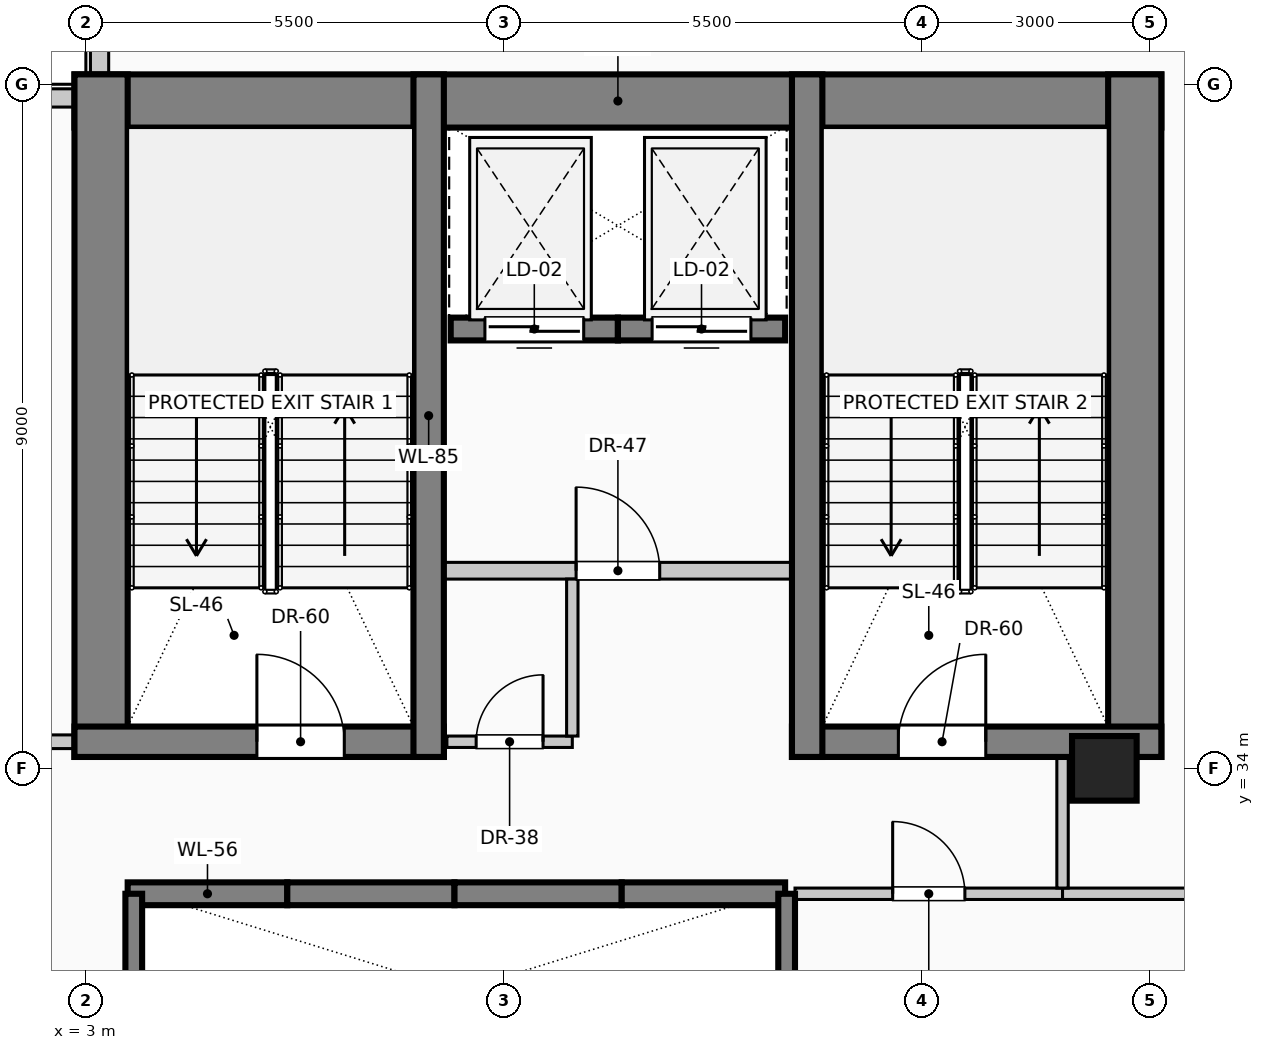
"""IFC4 building model, lengths in metres.
Left out: names, types, materials, properties, quantities, classifications, styles, units other than length and angle.
Written with IfcOpenShell. Run it as: python <this file> out.ifc"""

import sys

from ifc_helpers import new_model, si_unit, direction, frame, frame_2d, origin, origin_2d, place, context, subcontext, project, spatial, rectangle, circle, extrude, element, fill, save


model = new_model("IFC4")
c1 = context("Model", 3, precision=1e-05, world=origin(), true_north=direction((0.0, 1.0)))
c2 = subcontext(c1, "Body", "Model", "MODEL_VIEW")
j1 = project(units=[si_unit("LENGTHUNIT", "METRE"), si_unit("PLANEANGLEUNIT", "RADIAN")], contexts=[c1])
p1 = place(None, origin())
s1 = spatial("IfcSite", under=j1, at=p1, CompositionType="ELEMENT")
p2 = place(p1, origin())
s2 = spatial("IfcBuilding", under=s1, at=p2, CompositionType="ELEMENT")
p3 = place(p2, frame((0.0, 0.0, 182.6)))
s3 = spatial("IfcBuildingStorey", under=s2, at=p3, CompositionType="ELEMENT", Elevation=182.6)
p4 = place(p3, frame((2.85, 42.78, 0.0), z_axis=(0.0, 0.0, 1.0), x_axis=(1.0, 0.0, 0.0)))
e1 = element("IfcWall", 1, at=p4, inside=s3, PredefinedType="SHEAR", context=c2, shape_type="SweptSolid", body=[
    extrude(rectangle(XDim=14.3, YDim=0.7, at=frame_2d((7.15, 0.0))), origin(), (0.0, 0.0, 1.0), 4.0),
])
for number, where, z_axis, x_axis in (
    (2, (3.2, 34.15, 0.0), (0.0, 0.0, 1.0), (0.0, 1.0, 0.0)),
    (3, (16.8, 34.15, 0.0), (0.0, 0.0, 1.0), (0.0, 1.0, 0.0)),
):
    element("IfcWall", number, at=place(p3, frame(where, z_axis=z_axis, x_axis=x_axis)), inside=s3, PredefinedType="SHEAR", context=c2, shape_type="SweptSolid", body=[
        extrude(rectangle(XDim=8.98, YDim=0.7, at=frame_2d((4.49, 0.0))), origin(), (0.0, 0.0, 1.0), 4.0),
    ])
p5 = place(p3, frame((2.85, 34.35, 0.0), z_axis=(0.0, 0.0, 1.0), x_axis=(1.0, 0.0, 0.0)))
e4 = element("IfcWall", 4, at=p5, inside=s3, PredefinedType="SHEAR", context=c2, shape_type="SweptSolid", body=[
    extrude(rectangle(XDim=4.86, YDim=0.4, at=frame_2d((2.43, 0.0))), origin(), (0.0, 0.0, 1.0), 4.0),
])
p6 = place(p5, frame((2.4, 0.0, 0.0)))
e5 = element("IfcOpeningElement", 5, at=p6, cuts=e4, PredefinedType="OPENING", context=c2, shape_type="SweptSolid", body=[
    extrude(rectangle(XDim=1.15, YDim=2.2, at=frame_2d((0.575, 1.1))), frame((0.0, 0.21, 0.0), z_axis=(0.0, -1.0, 0.0), x_axis=(1.0, 0.0, 0.0)), (0.0, 0.0, 1.0), 0.42),
])
p7 = place(p3, frame((12.29, 34.35, 0.0), z_axis=(0.0, 0.0, 1.0), x_axis=(1.0, 0.0, 0.0)))
e6 = element("IfcWall", 6, at=p7, inside=s3, PredefinedType="SHEAR", context=c2, shape_type="SweptSolid", body=[
    extrude(rectangle(XDim=4.86, YDim=0.4, at=frame_2d((2.43, 0.0))), origin(), (0.0, 0.0, 1.0), 4.0),
])
p8 = place(p7, frame((1.4, 0.0, 0.0)))
e7 = element("IfcOpeningElement", 7, at=p8, cuts=e6, PredefinedType="OPENING", context=c2, shape_type="SweptSolid", body=[
    extrude(rectangle(XDim=1.15, YDim=2.2, at=frame_2d((0.575, 1.1))), frame((0.0, 0.21, 0.0), z_axis=(0.0, -1.0, 0.0), x_axis=(1.0, 0.0, 0.0)), (0.0, 0.0, 1.0), 0.42),
])
for number, where, z_axis, x_axis in (
    (8, (7.51, 34.15, 0.0), (0.0, 0.0, 1.0), (0.0, 1.0, 0.0)),
    (9, (12.49, 34.15, 0.0), (0.0, 0.0, 1.0), (0.0, 1.0, 0.0)),
):
    element("IfcWall", number, at=place(p3, frame(where, z_axis=z_axis, x_axis=x_axis)), inside=s3, PredefinedType="SHEAR", context=c2, shape_type="SweptSolid", body=[
        extrude(rectangle(XDim=8.98, YDim=0.4, at=frame_2d((4.49, 0.0))), origin(), (0.0, 0.0, 1.0), 4.0),
    ])
p9 = place(p3, frame((16.4, 34.0, 0.0), z_axis=(0.0, 0.0, 1.0), x_axis=(1.0, 0.0, 0.0)))
e10 = element("IfcColumn", 10, at=p9, inside=s3, PredefinedType="COLUMN", context=c2, shape_type="SweptSolid", body=[
    extrude(circle(Radius=0.425, at=origin_2d()), origin(), (0.0, 0.0, 1.0), 4.0),
])
p10 = place(p3, frame((0.6, 42.82, 0.0), z_axis=(0.0, 0.0, 1.0), x_axis=(1.0, 0.0, 0.0)))
e11 = element("IfcWall", 11, at=p10, inside=s3, PredefinedType="SOLIDWALL", context=c2, shape_type="SweptSolid", body=[
    extrude(rectangle(XDim=2.245, YDim=0.24, at=frame_2d((1.123, 0.0))), origin(), (0.0, 0.0, 1.0), 3.75),
])
p11 = place(p3, frame((3.18, 43.135, 0.0), z_axis=(0.0, 0.0, 1.0), x_axis=(0.0, 1.0, 0.0)))
e12 = element("IfcWall", 12, at=p11, inside=s3, PredefinedType="SOLIDWALL", context=c2, shape_type="SweptSolid", body=[
    extrude(rectangle(XDim=2.265, YDim=0.24, at=frame_2d((1.132, 0.0))), origin(), (0.0, 0.0, 1.0), 3.75),
])
p12 = place(p3, frame((3.55, 32.35, 0.0), z_axis=(0.0, 0.0, 1.0), x_axis=(1.0, 0.0, 0.0)))
e13 = element("IfcWall", 13, at=p12, inside=s3, PredefinedType="SOLIDWALL", context=c2, shape_type="SweptSolid", body=[
    extrude(rectangle(XDim=2.1, YDim=0.3, at=frame_2d((1.05, 0.0))), origin(), (0.0, 0.0, 1.0), 4.0),
])
p13 = place(p3, frame((5.65, 32.35, 0.0), z_axis=(0.0, 0.0, 1.0), x_axis=(1.0, 0.0, 0.0)))
e14 = element("IfcWall", 14, at=p13, inside=s3, PredefinedType="SOLIDWALL", context=c2, shape_type="SweptSolid", body=[
    extrude(rectangle(XDim=2.2, YDim=0.3, at=frame_2d((1.1, 0.0))), origin(), (0.0, 0.0, 1.0), 4.0),
])
p14 = place(p3, frame((7.85, 32.35, 0.0), z_axis=(0.0, 0.0, 1.0), x_axis=(1.0, 0.0, 0.0)))
e15 = element("IfcWall", 15, at=p14, inside=s3, PredefinedType="SOLIDWALL", context=c2, shape_type="SweptSolid", body=[
    extrude(rectangle(XDim=2.2, YDim=0.3, at=frame_2d((1.1, 0.0))), origin(), (0.0, 0.0, 1.0), 4.0),
])
p15 = place(p3, frame((10.05, 32.35, 0.0), z_axis=(0.0, 0.0, 1.0), x_axis=(1.0, 0.0, 0.0)))
e16 = element("IfcWall", 16, at=p15, inside=s3, PredefinedType="SOLIDWALL", context=c2, shape_type="SweptSolid", body=[
    extrude(rectangle(XDim=2.15, YDim=0.3, at=frame_2d((1.075, 0.0))), origin(), (0.0, 0.0, 1.0), 4.0),
])
p16 = place(p3, frame((10.0, 39.78, 0.0), z_axis=(0.0, 0.0, 1.0), x_axis=(-1.0, 0.0, 0.0)))
e17 = element("IfcWall", 17, at=p16, inside=s3, PredefinedType="SOLIDWALL", context=c2, shape_type="SweptSolid", body=[
    extrude(rectangle(XDim=2.2, YDim=0.3, at=frame_2d((1.1, 0.0))), origin(), (0.0, 0.0, 1.0), 4.0),
])
p17 = place(p16, frame((0.45, 0.0, 0.0)))
e18 = element("IfcOpeningElement", 18, at=p17, cuts=e17, PredefinedType="OPENING", context=c2, shape_type="SweptSolid", body=[
    extrude(rectangle(XDim=1.3, YDim=2.25, at=frame_2d((0.65, 1.125))), frame((0.0, 0.16, 0.0), z_axis=(0.0, -1.0, 0.0), x_axis=(1.0, 0.0, 0.0)), (0.0, 0.0, 1.0), 0.32),
])
p18 = place(p3, frame((12.2, 39.78, 0.0), z_axis=(0.0, 0.0, 1.0), x_axis=(-1.0, 0.0, 0.0)))
e19 = element("IfcWall", 19, at=p18, inside=s3, PredefinedType="SOLIDWALL", context=c2, shape_type="SweptSolid", body=[
    extrude(rectangle(XDim=2.2, YDim=0.3, at=frame_2d((1.1, 0.0))), origin(), (0.0, 0.0, 1.0), 4.0),
])
p19 = place(p18, frame((0.45, 0.0, 0.0)))
e20 = element("IfcOpeningElement", 20, at=p19, cuts=e19, PredefinedType="OPENING", context=c2, shape_type="SweptSolid", body=[
    extrude(rectangle(XDim=1.3, YDim=2.25, at=frame_2d((0.65, 1.125))), frame((0.0, 0.16, 0.0), z_axis=(0.0, -1.0, 0.0), x_axis=(1.0, 0.0, 0.0)), (0.0, 0.0, 1.0), 0.32),
])
p20 = place(p3, frame((3.63, 26.8, 0.0), z_axis=(0.0, 0.0, 1.0), x_axis=(0.0, 1.0, 0.0)))
e21 = element("IfcWall", 21, at=p20, inside=s3, PredefinedType="SOLIDWALL", context=c2, shape_type="SweptSolid", body=[
    extrude(rectangle(XDim=5.55, YDim=0.22, at=frame_2d((2.775, 0.0))), origin(), (0.0, 0.0, 1.0), 4.0),
])
p21 = place(p3, frame((12.22, 29.75, 0.0), z_axis=(0.0, 0.0, 1.0), x_axis=(0.0, 1.0, 0.0)))
e22 = element("IfcWall", 22, at=p21, inside=s3, PredefinedType="SOLIDWALL", context=c2, shape_type="SweptSolid", body=[
    extrude(rectangle(XDim=2.6, YDim=0.22, at=frame_2d((1.3, 0.0))), origin(), (0.0, 0.0, 1.0), 4.0),
])
p22 = place(p3, frame((7.51, 36.6, 0.0), z_axis=(0.0, 0.0, 1.0), x_axis=(1.0, 0.0, 0.0)))
e23 = element("IfcWall", 23, at=p22, inside=s3, PredefinedType="PARTITIONING", context=c2, shape_type="SweptSolid", body=[
    extrude(rectangle(XDim=4.98, YDim=0.22, at=frame_2d((2.49, 0.0))), origin(), (0.0, 0.0, 1.0), 3.75),
])
p23 = place(p22, frame((1.94, 0.0, 0.0)))
e24 = element("IfcOpeningElement", 24, at=p23, cuts=e23, PredefinedType="OPENING", context=c2, shape_type="SweptSolid", body=[
    extrude(rectangle(XDim=1.1, YDim=2.2, at=frame_2d((0.55, 1.1))), frame((0.0, 0.12, 0.0), z_axis=(0.0, -1.0, 0.0), x_axis=(1.0, 0.0, 0.0)), (0.0, 0.0, 1.0), 0.24),
])
p24 = place(p3, frame((12.33, 32.35, 0.0), z_axis=(0.0, 0.0, 1.0), x_axis=(1.0, 0.0, 0.0)))
e25 = element("IfcWall", 25, at=p24, inside=s3, PredefinedType="PARTITIONING", context=c2, shape_type="SweptSolid", body=[
    extrude(rectangle(XDim=3.52, YDim=0.15, at=frame_2d((1.76, 0.0))), origin(), (0.0, 0.0, 1.0), 3.75),
])
p25 = place(p24, frame((1.285, 0.0, 0.0)))
e26 = element("IfcOpeningElement", 26, at=p25, cuts=e25, PredefinedType="OPENING", context=c2, shape_type="SweptSolid", body=[
    extrude(rectangle(XDim=0.95, YDim=2.15, at=frame_2d((0.475, 1.075))), frame((0.0, 0.085, 0.0), z_axis=(0.0, -1.0, 0.0), x_axis=(1.0, 0.0, 0.0)), (0.0, 0.0, 1.0), 0.17),
])
p26 = place(p3, frame((15.85, 32.35, 0.0), z_axis=(0.0, 0.0, 1.0), x_axis=(1.0, 0.0, 0.0)))
e27 = element("IfcWall", 27, at=p26, inside=s3, PredefinedType="PARTITIONING", context=c2, shape_type="SweptSolid", body=[
    extrude(rectangle(XDim=8.03, YDim=0.15, at=frame_2d((4.015, 0.0))), origin(), (0.0, 0.0, 1.0), 3.75),
])
p27 = place(p3, frame((1.15, 34.35, 0.0), z_axis=(0.0, 0.0, 1.0), x_axis=(1.0, 0.0, 0.0)))
e28 = element("IfcWall", 28, at=p27, inside=s3, PredefinedType="PARTITIONING", context=c2, shape_type="SweptSolid", body=[
    extrude(rectangle(XDim=1.7, YDim=0.18, at=frame_2d((0.85, 0.0))), origin(), (0.0, 0.0, 1.0), 3.75),
])
p28 = place(p3, frame((7.75, 34.35, 0.0), z_axis=(0.0, 0.0, 1.0), x_axis=(1.0, 0.0, 0.0)))
e29 = element("IfcWall", 29, at=p28, inside=s3, PredefinedType="PARTITIONING", context=c2, shape_type="SweptSolid", body=[
    extrude(rectangle(XDim=1.65, YDim=0.15, at=frame_2d((0.825, 0.0))), origin(), (0.0, 0.0, 1.0), 3.75),
])
p29 = place(p28, frame((0.385, 0.0, 0.0)))
e30 = element("IfcOpeningElement", 30, at=p29, cuts=e29, PredefinedType="OPENING", context=c2, shape_type="SweptSolid", body=[
    extrude(rectangle(XDim=0.88, YDim=2.1, at=frame_2d((0.44, 1.05))), frame((0.0, 0.085, 0.0), z_axis=(0.0, -1.0, 0.0), x_axis=(1.0, 0.0, 0.0)), (0.0, 0.0, 1.0), 0.17),
])
p30 = place(p3, frame((9.4, 34.425, 0.0), z_axis=(0.0, 0.0, 1.0), x_axis=(0.0, 1.0, 0.0)))
e31 = element("IfcWall", 31, at=p30, inside=s3, PredefinedType="PARTITIONING", context=c2, shape_type="SweptSolid", body=[
    extrude(rectangle(XDim=2.065, YDim=0.15, at=frame_2d((1.032, 0.0))), origin(), (0.0, 0.0, 1.0), 3.75),
])
p31 = place(p3, frame((15.85, 32.425, 0.0), z_axis=(0.0, 0.0, 1.0), x_axis=(0.0, 1.0, 0.0)))
e32 = element("IfcWall", 32, at=p31, inside=s3, PredefinedType="PARTITIONING", context=c2, shape_type="SweptSolid", body=[
    extrude(rectangle(XDim=1.725, YDim=0.15, at=frame_2d((0.862, 0.0))), origin(), (0.0, 0.0, 1.0), 3.75),
])
p32 = place(p17, origin())
e33 = element("IfcDoor", 33, at=p32, inside=s3, OperationType="SLIDING_TO_LEFT", PredefinedType="DOOR", context=c2, shape_type="SweptSolid", body=[
    extrude(rectangle(XDim=1.3, YDim=2.25, at=frame_2d((0.65, 1.125))), frame((0.0, 0.025, 0.0), z_axis=(0.0, -1.0, 0.0), x_axis=(1.0, 0.0, 0.0)), (0.0, 0.0, 1.0), 0.05),
])
fill(e18, e33)
p33 = place(p19, origin())
e34 = element("IfcDoor", 34, at=p33, inside=s3, OperationType="SLIDING_TO_RIGHT", PredefinedType="DOOR", context=c2, shape_type="SweptSolid", body=[
    extrude(rectangle(XDim=1.3, YDim=2.25, at=frame_2d((0.65, 1.125))), frame((0.0, 0.025, 0.0), z_axis=(0.0, -1.0, 0.0), x_axis=(1.0, 0.0, 0.0)), (0.0, 0.0, 1.0), 0.05),
])
fill(e20, e34)
p34 = place(p6, origin())
e35 = element("IfcDoor", 35, at=p34, inside=s3, OperationType="SINGLE_SWING_LEFT", PredefinedType="DOOR", context=c2, shape_type="SweptSolid", body=[
    extrude(rectangle(XDim=1.15, YDim=2.2, at=frame_2d((0.575, 1.1))), frame((0.0, 0.025, 0.0), z_axis=(0.0, -1.0, 0.0), x_axis=(1.0, 0.0, 0.0)), (0.0, 0.0, 1.0), 0.05),
])
fill(e5, e35)
p35 = place(p8, origin())
e36 = element("IfcDoor", 36, at=p35, inside=s3, OperationType="SINGLE_SWING_RIGHT", PredefinedType="DOOR", context=c2, shape_type="SweptSolid", body=[
    extrude(rectangle(XDim=1.15, YDim=2.2, at=frame_2d((0.575, 1.1))), frame((0.0, 0.025, 0.0), z_axis=(0.0, -1.0, 0.0), x_axis=(1.0, 0.0, 0.0)), (0.0, 0.0, 1.0), 0.05),
])
fill(e7, e36)
p36 = place(p23, origin())
e37 = element("IfcDoor", 37, at=p36, inside=s3, OperationType="SINGLE_SWING_LEFT", PredefinedType="DOOR", context=c2, shape_type="SweptSolid", body=[
    extrude(rectangle(XDim=1.1, YDim=2.2, at=frame_2d((0.55, 1.1))), frame((0.0, 0.025, 0.0), z_axis=(0.0, -1.0, 0.0), x_axis=(1.0, 0.0, 0.0)), (0.0, 0.0, 1.0), 0.05),
])
fill(e24, e37)
p37 = place(p25, origin())
e38 = element("IfcDoor", 38, at=p37, inside=s3, OperationType="SINGLE_SWING_LEFT", PredefinedType="DOOR", context=c2, shape_type="SweptSolid", body=[
    extrude(rectangle(XDim=0.95, YDim=2.15, at=frame_2d((0.475, 1.075))), frame((0.0, 0.025, 0.0), z_axis=(0.0, -1.0, 0.0), x_axis=(1.0, 0.0, 0.0)), (0.0, 0.0, 1.0), 0.05),
])
fill(e26, e38)
p38 = place(p29, origin())
e39 = element("IfcDoor", 39, at=p38, inside=s3, OperationType="SINGLE_SWING_RIGHT", PredefinedType="DOOR", context=c2, shape_type="SweptSolid", body=[
    extrude(rectangle(XDim=0.88, YDim=2.1, at=frame_2d((0.44, 1.05))), frame((0.0, 0.025, 0.0), z_axis=(0.0, -1.0, 0.0), x_axis=(1.0, 0.0, 0.0)), (0.0, 0.0, 1.0), 0.05),
])
fill(e30, e39)
save(model, sys.argv[1])
